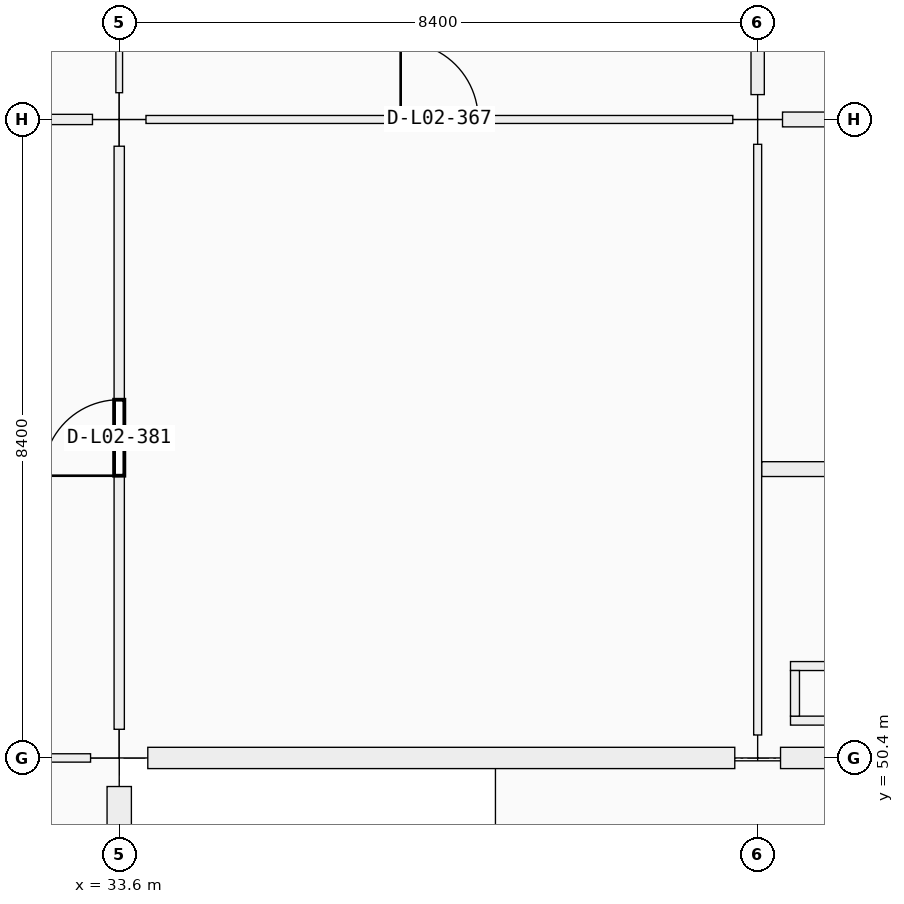
"""IFC4 building model, lengths in metres.
Left out: names, types, materials, properties, quantities, classifications, styles, units other than length and angle.
Written with IfcOpenShell. Run it as: python <this file> out.ifc"""

import sys

from ifc_helpers import new_model, si_unit, direction, frame, frame_2d, origin, origin_2d, place, context, subcontext, project, spatial, rectangle, extrude, element, fill, save


model = new_model("IFC4")
c1 = context("Model", 3, precision=1e-05, world=origin(), true_north=direction((0.0, 1.0)))
c2 = subcontext(c1, "Body", "Model", "MODEL_VIEW")
j1 = project(units=[si_unit("LENGTHUNIT", "METRE"), si_unit("PLANEANGLEUNIT", "RADIAN")], contexts=[c1])
p1 = place(None, origin())
s1 = spatial("IfcSite", under=j1, at=p1, CompositionType="ELEMENT")
p2 = place(p1, origin())
s2 = spatial("IfcBuilding", under=s1, at=p2, CompositionType="ELEMENT")
p3 = place(p2, frame((0.0, 0.0, 10.26)))
s3 = spatial("IfcBuildingStorey", under=s2, at=p3, CompositionType="ELEMENT", Elevation=10.26)
p4 = place(p3, frame((33.6, 50.4, 0.0), z_axis=(0.0, 0.0, 1.0), x_axis=(1.0, 0.0, 0.0)))
e1 = element("IfcColumn", 1, at=p4, inside=s3, PredefinedType="COLUMN", context=c2, shape_type="SweptSolid", body=[
    extrude(rectangle(XDim=0.75, YDim=0.75, at=origin_2d()), origin(), (0.0, 0.0, 1.0), 4.5),
])
p5 = place(p3, frame((33.6, 58.8, 0.0), z_axis=(0.0, 0.0, 1.0), x_axis=(1.0, 0.0, 0.0)))
e2 = element("IfcColumn", 2, at=p5, inside=s3, PredefinedType="COLUMN", context=c2, shape_type="SweptSolid", body=[
    extrude(rectangle(XDim=0.7, YDim=0.7, at=origin_2d()), origin(), (0.0, 0.0, 1.0), 4.5),
])
p6 = place(p3, frame((42.0, 50.4, 0.0), z_axis=(0.0, 0.0, 1.0), x_axis=(1.0, 0.0, 0.0)))
e3 = element("IfcColumn", 3, at=p6, inside=s3, PredefinedType="COLUMN", context=c2, shape_type="SweptSolid", body=[
    extrude(rectangle(XDim=0.6, YDim=0.6, at=origin_2d()), origin(), (0.0, 0.0, 1.0), 4.5),
])
p7 = place(p3, frame((42.0, 58.8, 0.0), z_axis=(0.0, 0.0, 1.0), x_axis=(1.0, 0.0, 0.0)))
e4 = element("IfcColumn", 4, at=p7, inside=s3, PredefinedType="COLUMN", context=c2, shape_type="SweptSolid", body=[
    extrude(rectangle(XDim=0.65, YDim=0.65, at=origin_2d()), origin(), (0.0, 0.0, 1.0), 4.5),
])
p8 = place(p3, frame((33.6, 50.024, 0.0), z_axis=(0.0, 0.0, 1.0), x_axis=(0.0, -1.0, 0.0)))
e5 = element("IfcWall", 5, at=p8, inside=s3, PredefinedType="SOLIDWALL", context=c2, shape_type="SweptSolid", body=[
    extrude(rectangle(XDim=7.673, YDim=0.32, at=frame_2d((3.836, 0.0))), origin(), (0.0, 0.0, 1.0), 3.54),
])
p9 = place(p8, frame((3.236, 0.0, 0.9)))
e6 = element("IfcOpeningElement", 6, at=p9, cuts=e5, PredefinedType="OPENING", context=c2, shape_type="SweptSolid", body=[
    extrude(rectangle(XDim=1.2, YDim=2.1, at=frame_2d((0.6, 1.05))), frame((0.0, 0.16, 0.0), z_axis=(0.0, -1.0, 0.0), x_axis=(1.0, 0.0, 0.0)), (0.0, 0.0, 1.0), 0.32),
])
p10 = place(p3, frame((41.699, 50.4, 0.0), z_axis=(0.0, 0.0, 1.0), x_axis=(-1.0, 0.0, 0.0)))
e7 = element("IfcWall", 7, at=p10, inside=s3, PredefinedType="SOLIDWALL", context=c2, shape_type="SweptSolid", body=[
    extrude(rectangle(XDim=7.723, YDim=0.28, at=frame_2d((3.861, 0.0))), origin(), (0.0, 0.0, 1.0), 3.54),
])
p11 = place(p10, frame((2.761, 0.0, 0.9)))
e8 = element("IfcOpeningElement", 8, at=p11, cuts=e7, PredefinedType="OPENING", context=c2, shape_type="SweptSolid", body=[
    extrude(rectangle(XDim=2.2, YDim=1.35, at=frame_2d((1.1, 0.675))), frame((0.0, 0.14, 0.0), z_axis=(0.0, -1.0, 0.0), x_axis=(1.0, 0.0, 0.0)), (0.0, 0.0, 1.0), 0.28),
])
p12 = place(p3, frame((50.074, 50.4, 0.0), z_axis=(0.0, 0.0, 1.0), x_axis=(-1.0, 0.0, 0.0)))
e9 = element("IfcWall", 9, at=p12, inside=s3, PredefinedType="SOLIDWALL", context=c2, shape_type="SweptSolid", body=[
    extrude(rectangle(XDim=7.773, YDim=0.28, at=frame_2d((3.886, 0.0))), origin(), (0.0, 0.0, 1.0), 3.54),
])
p13 = place(p12, frame((2.936, 0.0, 0.9)))
e10 = element("IfcOpeningElement", 10, at=p13, cuts=e9, PredefinedType="OPENING", context=c2, shape_type="SweptSolid", body=[
    extrude(rectangle(XDim=1.9, YDim=1.75, at=frame_2d((0.95, 0.875))), frame((0.0, 0.14, 0.0), z_axis=(0.0, -1.0, 0.0), x_axis=(1.0, 0.0, 0.0)), (0.0, 0.0, 1.0), 0.28),
])
for number, where, z_axis, x_axis in (
    (11, (42.432, 50.891, 0.0), (0.0, 0.0, 1.0), (1.0, 0.0, 0.0)),
    (12, (42.432, 51.609, 0.0), (0.0, 0.0, 1.0), (1.0, 0.0, 0.0)),
):
    element("IfcWall", number, at=place(p3, frame(where, z_axis=z_axis, x_axis=x_axis)), inside=s3, PredefinedType="PARTITIONING", context=c2, shape_type="SweptSolid", body=[
        extrude(rectangle(XDim=1.036, YDim=0.118, at=frame_2d((0.518, 0.0))), origin(), (0.0, 0.0, 1.0), 3.53),
    ])
p14 = place(p3, frame((42.491, 50.95, 0.0), z_axis=(0.0, 0.0, 1.0), x_axis=(0.0, 1.0, 0.0)))
e13 = element("IfcWall", 13, at=p14, inside=s3, PredefinedType="PARTITIONING", context=c2, shape_type="SweptSolid", body=[
    extrude(rectangle(XDim=0.6, YDim=0.118, at=frame_2d((0.3, 0.0))), origin(), (0.0, 0.0, 1.0), 3.53),
])
p15 = place(p3, frame((25.552, 50.4, 0.0), z_axis=(0.0, 0.0, 1.0), x_axis=(1.0, 0.0, 0.0)))
e14 = element("IfcWall", 14, at=p15, inside=s3, PredefinedType="MOVABLE", context=c2, shape_type="SweptSolid", body=[
    extrude(rectangle(XDim=7.671, YDim=0.11, at=frame_2d((3.835, 0.0))), origin(), (0.0, 0.0, 1.0), 3.37),
])
p16 = place(p15, frame((3.296, 0.0, 0.0)))
e15 = element("IfcOpeningElement", 15, at=p16, cuts=e14, PredefinedType="OPENING", context=c2, shape_type="SweptSolid", body=[
    extrude(rectangle(XDim=1.08, YDim=2.25, at=frame_2d((0.54, 1.125))), frame((0.0, 0.055, 0.0), z_axis=(0.0, -1.0, 0.0), x_axis=(1.0, 0.0, 0.0)), (0.0, 0.0, 1.0), 0.11),
])
p17 = place(p3, frame((25.577, 58.8, 0.0), z_axis=(0.0, 0.0, 1.0), x_axis=(1.0, 0.0, 0.0)))
e16 = element("IfcWall", 16, at=p17, inside=s3, PredefinedType="PARTITIONING", context=c2, shape_type="SweptSolid", body=[
    extrude(rectangle(XDim=7.671, YDim=0.135, at=frame_2d((3.835, 0.0))), origin(), (0.0, 0.0, 1.0), 3.37),
])
p18 = place(p17, frame((3.306, 0.0, 0.0)))
e17 = element("IfcOpeningElement", 17, at=p18, cuts=e16, PredefinedType="OPENING", context=c2, shape_type="SweptSolid", body=[
    extrude(rectangle(XDim=1.06, YDim=2.25, at=frame_2d((0.53, 1.125))), frame((0.0, 0.067, 0.0), z_axis=(0.0, -1.0, 0.0), x_axis=(1.0, 0.0, 0.0)), (0.0, 0.0, 1.0), 0.135),
])
p19 = place(p3, frame((33.952, 58.8, 0.0), z_axis=(0.0, 0.0, 1.0), x_axis=(1.0, 0.0, 0.0)))
e18 = element("IfcWall", 18, at=p19, inside=s3, PredefinedType="PARTITIONING", context=c2, shape_type="SweptSolid", body=[
    extrude(rectangle(XDim=7.721, YDim=0.105, at=frame_2d((3.861, 0.0))), origin(), (0.0, 0.0, 1.0), 3.37),
])
p20 = place(p19, frame((3.351, 0.0, 0.0)))
e19 = element("IfcOpeningElement", 19, at=p20, cuts=e18, PredefinedType="OPENING", context=c2, shape_type="SweptSolid", body=[
    extrude(rectangle(XDim=1.02, YDim=2.2, at=frame_2d((0.51, 1.1))), frame((0.0, 0.052, 0.0), z_axis=(0.0, -1.0, 0.0), x_axis=(1.0, 0.0, 0.0)), (0.0, 0.0, 1.0), 0.105),
])
p21 = place(p3, frame((42.327, 58.8, 0.0), z_axis=(0.0, 0.0, 1.0), x_axis=(1.0, 0.0, 0.0)))
e20 = element("IfcWall", 20, at=p21, inside=s3, PredefinedType="PARTITIONING", context=c2, shape_type="SweptSolid", body=[
    extrude(rectangle(XDim=7.771, YDim=0.195, at=frame_2d((3.885, 0.0))), origin(), (0.0, 0.0, 1.0), 3.37),
])
p22 = place(p3, frame((33.6, 50.777, 0.0), z_axis=(0.0, 0.0, 1.0), x_axis=(0.0, 1.0, 0.0)))
e21 = element("IfcWall", 21, at=p22, inside=s3, PredefinedType="PARTITIONING", context=c2, shape_type="SweptSolid", body=[
    extrude(rectangle(XDim=7.671, YDim=0.135, at=frame_2d((3.835, 0.0))), origin(), (0.0, 0.0, 1.0), 3.37),
])
p23 = place(p22, frame((3.336, 0.0, 0.0)))
e22 = element("IfcOpeningElement", 22, at=p23, cuts=e21, PredefinedType="OPENING", context=c2, shape_type="SweptSolid", body=[
    extrude(rectangle(XDim=1.0, YDim=2.2, at=frame_2d((0.5, 1.1))), frame((0.0, 0.067, 0.0), z_axis=(0.0, -1.0, 0.0), x_axis=(1.0, 0.0, 0.0)), (0.0, 0.0, 1.0), 0.135),
])
p24 = place(p3, frame((33.6, 59.152, 0.0), z_axis=(0.0, 0.0, 1.0), x_axis=(0.0, 1.0, 0.0)))
e23 = element("IfcWall", 23, at=p24, inside=s3, PredefinedType="PARTITIONING", context=c2, shape_type="SweptSolid", body=[
    extrude(rectangle(XDim=7.671, YDim=0.088, at=frame_2d((3.835, 0.0))), origin(), (0.0, 0.0, 1.0), 3.37),
])
p25 = place(p24, frame((3.365, 0.0, 0.0)))
e24 = element("IfcOpeningElement", 24, at=p25, cuts=e23, PredefinedType="OPENING", context=c2, shape_type="SweptSolid", body=[
    extrude(rectangle(XDim=0.94, YDim=2.15, at=frame_2d((0.47, 1.075))), frame((0.0, 0.044, 0.0), z_axis=(0.0, -1.0, 0.0), x_axis=(1.0, 0.0, 0.0)), (0.0, 0.0, 1.0), 0.088),
])
p26 = place(p3, frame((42.0, 50.702, 0.0), z_axis=(0.0, 0.0, 1.0), x_axis=(0.0, 1.0, 0.0)))
e25 = element("IfcWall", 25, at=p26, inside=s3, PredefinedType="PARTITIONING", context=c2, shape_type="SweptSolid", body=[
    extrude(rectangle(XDim=7.771, YDim=0.105, at=frame_2d((3.885, 0.0))), origin(), (0.0, 0.0, 1.0), 3.37),
])
p27 = place(p3, frame((42.0, 59.127, 0.0), z_axis=(0.0, 0.0, 1.0), x_axis=(0.0, 1.0, 0.0)))
e26 = element("IfcWall", 26, at=p27, inside=s3, PredefinedType="PARTITIONING", context=c2, shape_type="SweptSolid", body=[
    extrude(rectangle(XDim=7.721, YDim=0.175, at=frame_2d((3.86, 0.0))), origin(), (0.0, 0.0, 1.0), 3.37),
])
p28 = place(p3, frame((42.054, 54.2, 0.0), z_axis=(0.0, 0.0, 1.0), x_axis=(1.0, 0.0, 0.0)))
e27 = element("IfcWall", 27, at=p28, inside=s3, PredefinedType="PARTITIONING", context=c2, shape_type="SweptSolid", body=[
    extrude(rectangle(XDim=8.246, YDim=0.195, at=frame_2d((4.123, 0.0))), origin(), (0.0, 0.0, 1.0), 3.37),
])
p29 = place(p11, origin())
e28 = element("IfcWindow", 28, at=p29, inside=s3, PartitioningType="SINGLE_PANEL", PredefinedType="WINDOW", context=c2, shape_type="SweptSolid", body=[
    extrude(rectangle(XDim=2.2, YDim=1.35, at=frame_2d((1.1, 0.675))), frame((0.0, 0.03, 0.0), z_axis=(0.0, -1.0, 0.0), x_axis=(1.0, 0.0, 0.0)), (0.0, 0.0, 1.0), 0.06),
])
fill(e8, e28)
p30 = place(p20, origin())
e29 = element("IfcDoor", 29, at=p30, inside=s3, OperationType="SINGLE_SWING_LEFT", PredefinedType="DOOR", context=c2, shape_type="SweptSolid", body=[
    extrude(rectangle(XDim=1.02, YDim=2.2, at=frame_2d((0.51, 1.1))), frame((0.0, 0.025, 0.0), z_axis=(0.0, -1.0, 0.0), x_axis=(1.0, 0.0, 0.0)), (0.0, 0.0, 1.0), 0.05),
])
fill(e19, e29)
p31 = place(p23, origin())
e30 = element("IfcDoor", 30, at=p31, inside=s3, OperationType="SINGLE_SWING_LEFT", PredefinedType="DOOR", context=c2, shape_type="SweptSolid", body=[
    extrude(rectangle(XDim=1.0, YDim=2.2, at=frame_2d((0.5, 1.1))), frame((0.0, 0.025, 0.0), z_axis=(0.0, -1.0, 0.0), x_axis=(1.0, 0.0, 0.0)), (0.0, 0.0, 1.0), 0.05),
])
fill(e22, e30)
save(model, sys.argv[1])
